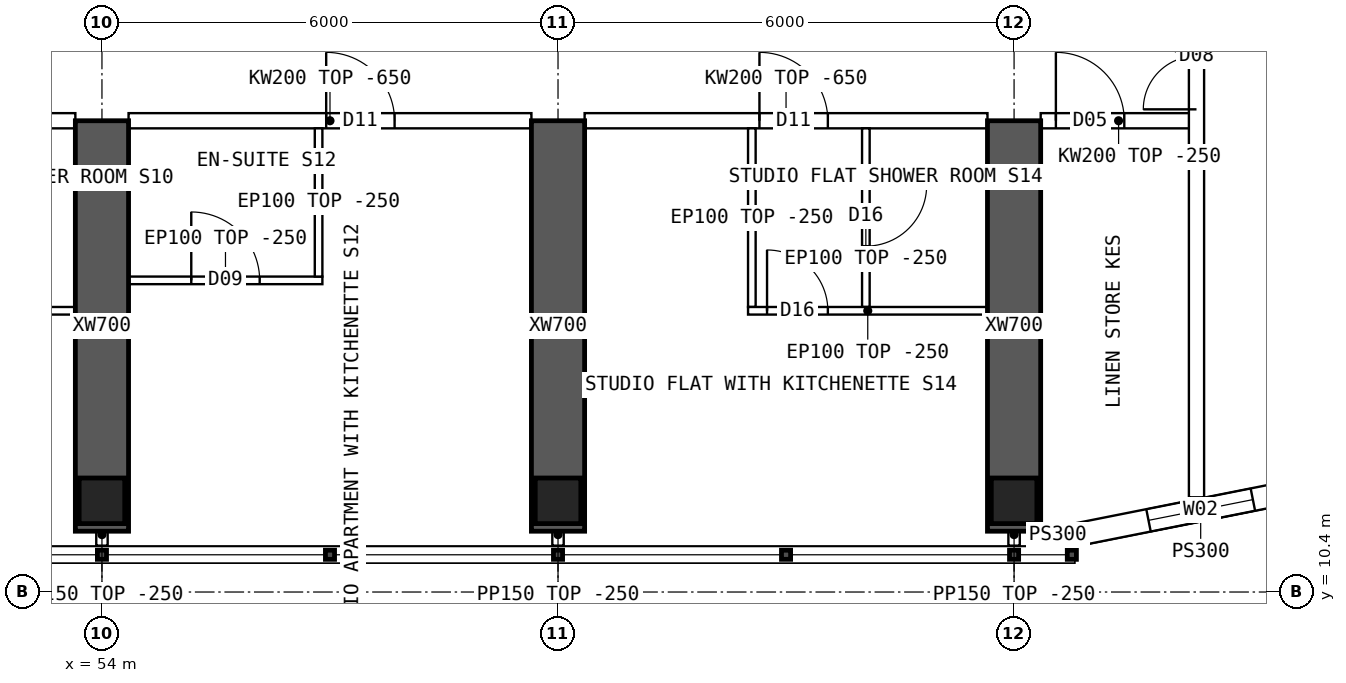
"""IFC4 building model, lengths in metres.
Left out: names, types, materials, properties, quantities, classifications, styles, units other than length and angle.
Written with IfcOpenShell. Run it as: python <this file> out.ifc"""

import sys

from ifc_helpers import new_model, si_unit, direction, frame, frame_2d, origin, origin_2d, place, context, subcontext, project, spatial, polyline, rectangle, hollow_rectangle, outline, extrude, element, fill, save


model = new_model("IFC4")
c1 = context("Model", 3, precision=1e-05, world=origin(), true_north=direction((0.0, 1.0)))
c2 = subcontext(c1, "Body", "Model", "MODEL_VIEW")
j1 = project(units=[si_unit("LENGTHUNIT", "METRE"), si_unit("PLANEANGLEUNIT", "RADIAN")], contexts=[c1])
p1 = place(None, origin())
s1 = spatial("IfcSite", under=j1, at=p1, CompositionType="ELEMENT")
p2 = place(p1, origin())
s2 = spatial("IfcBuilding", under=s1, at=p2, CompositionType="ELEMENT")
p3 = place(p2, frame((0.0, 0.0, 231.55)))
s3 = spatial("IfcBuildingStorey", under=s2, at=p3, CompositionType="ELEMENT", Elevation=231.55)
for number, where, z_axis, x_axis in (
    (1, (54.0, 11.6, 0.0), (0.0, 0.0, 1.0), (1.0, 0.0, 0.0)),
    (2, (60.0, 11.6, 0.0), (0.0, 0.0, 1.0), (1.0, 0.0, 0.0)),
    (3, (66.0, 11.6, 0.0), (0.0, 0.0, 1.0), (1.0, 0.0, 0.0)),
):
    element("IfcColumn", number, at=place(p3, frame(where, z_axis=z_axis, x_axis=x_axis)), inside=s3, PredefinedType="COLUMN", context=c2, shape_type="SweptSolid", body=[
        extrude(hollow_rectangle(XDim=0.6, YDim=0.6, WallThickness=0.06, at=origin_2d()), origin(), (0.0, 0.0, 1.0), 3.75),
    ])
for number, where, z_axis, x_axis in (
    (4, (54.0, 11.2, 0.0), (0.0, 0.0, 1.0), (0.0, 1.0, 0.0)),
    (5, (60.0, 11.2, 0.0), (0.0, 0.0, 1.0), (0.0, 1.0, 0.0)),
    (6, (66.0, 11.2, 0.0), (0.0, 0.0, 1.0), (0.0, 1.0, 0.0)),
):
    element("IfcWall", number, at=place(p3, frame(where, z_axis=z_axis, x_axis=x_axis)), inside=s3, PredefinedType="SHEAR", context=c2, shape_type="SweptSolid", body=[
        extrude(rectangle(XDim=5.4, YDim=0.7, at=frame_2d((2.7, 0.0))), origin(), (0.0, 0.0, 1.0), 3.75),
    ])
p4 = place(p3, frame((66.8, 11.15, 0.0), z_axis=(0.0, 0.0, 1.0), x_axis=(0.98078325777, 0.195100490205, 0.0)))
e7 = element("IfcWall", 7, at=p4, inside=s3, PredefinedType="SOLIDWALL", context=c2, shape_type="SweptSolid", body=[
    extrude(outline(polyline([(-0.03, -0.15), (3.405, -0.15), (3.345, 0.15), (0.03, 0.15), (-0.03, -0.15)])), origin(), (0.0, 0.0, 1.0), 3.5),
])
p5 = place(p4, frame((0.988, 0.0, 0.9)))
e8 = element("IfcOpeningElement", 8, at=p5, cuts=e7, PredefinedType="OPENING", context=c2, shape_type="SweptSolid", body=[
    extrude(rectangle(XDim=1.4, YDim=1.8, at=frame_2d((0.7, 0.9))), frame((0.0, 0.16, 0.0), z_axis=(0.0, -1.0, 0.0), x_axis=(1.0, 0.0, 0.0)), (0.0, 0.0, 1.0), 0.32),
])
p6 = place(p3, frame((66.8, 11.15, 0.0), z_axis=(0.0, 0.0, 1.0), x_axis=(-1.0, 0.0, 0.0)))
e9 = element("IfcWall", 9, at=p6, inside=s3, PredefinedType="SOLIDWALL", context=c2, shape_type="SweptSolid", body=[
    extrude(rectangle(XDim=0.45, YDim=0.3, at=frame_2d((0.225, 0.0))), origin(), (0.0, 0.0, 1.0), 3.5),
])
p7 = place(p3, frame((48.35, 16.6, 0.0), z_axis=(0.0, 0.0, 1.0), x_axis=(1.0, 0.0, 0.0)))
e10 = element("IfcWall", 10, at=p7, inside=s3, PredefinedType="SOLIDWALL", context=c2, shape_type="SweptSolid", body=[
    extrude(outline(polyline([(0.0, 0.0), (5.3, 0.0), (5.3, 3.1), (0.0, 3.1), (0.0, 0.0)])), frame((0.0, 0.1, 0.0), z_axis=(0.0, -1.0, 0.0), x_axis=(1.0, 0.0, 0.0)), (0.0, 0.0, 1.0), 0.2),
])
p8 = place(p7, frame((2.3, 0.0, 0.0)))
e11 = element("IfcOpeningElement", 11, at=p8, cuts=e10, PredefinedType="OPENING", context=c2, shape_type="SweptSolid", body=[
    extrude(rectangle(XDim=0.9, YDim=2.1, at=frame_2d((0.45, 1.05))), frame((0.0, 0.11, 0.0), z_axis=(0.0, -1.0, 0.0), x_axis=(1.0, 0.0, 0.0)), (0.0, 0.0, 1.0), 0.22),
])
p9 = place(p3, frame((54.35, 16.6, 0.0), z_axis=(0.0, 0.0, 1.0), x_axis=(1.0, 0.0, 0.0)))
e12 = element("IfcWall", 12, at=p9, inside=s3, PredefinedType="SOLIDWALL", context=c2, shape_type="SweptSolid", body=[
    extrude(outline(polyline([(0.0, 0.0), (5.3, 0.0), (5.3, 3.1), (0.0, 3.1), (0.0, 0.0)])), frame((0.0, 0.1, 0.0), z_axis=(0.0, -1.0, 0.0), x_axis=(1.0, 0.0, 0.0)), (0.0, 0.0, 1.0), 0.2),
])
p10 = place(p9, frame((2.6, 0.0, 0.0)))
e13 = element("IfcOpeningElement", 13, at=p10, cuts=e12, PredefinedType="OPENING", context=c2, shape_type="SweptSolid", body=[
    extrude(rectangle(XDim=0.9, YDim=2.1, at=frame_2d((0.45, 1.05))), frame((0.0, 0.11, 0.0), z_axis=(0.0, -1.0, 0.0), x_axis=(1.0, 0.0, 0.0)), (0.0, 0.0, 1.0), 0.22),
])
p11 = place(p3, frame((60.35, 16.6, 0.0), z_axis=(0.0, 0.0, 1.0), x_axis=(1.0, 0.0, 0.0)))
e14 = element("IfcWall", 14, at=p11, inside=s3, PredefinedType="SOLIDWALL", context=c2, shape_type="SweptSolid", body=[
    extrude(outline(polyline([(0.0, 0.0), (5.3, 0.0), (5.3, 3.1), (0.0, 3.1), (0.0, 0.0)])), frame((0.0, 0.1, 0.0), z_axis=(0.0, -1.0, 0.0), x_axis=(1.0, 0.0, 0.0)), (0.0, 0.0, 1.0), 0.2),
])
p12 = place(p11, frame((2.3, 0.0, 0.0)))
e15 = element("IfcOpeningElement", 15, at=p12, cuts=e14, PredefinedType="OPENING", context=c2, shape_type="SweptSolid", body=[
    extrude(rectangle(XDim=0.9, YDim=2.1, at=frame_2d((0.45, 1.05))), frame((0.0, 0.11, 0.0), z_axis=(0.0, -1.0, 0.0), x_axis=(1.0, 0.0, 0.0)), (0.0, 0.0, 1.0), 0.22),
])
p13 = place(p3, frame((66.35, 16.6, 0.0), z_axis=(0.0, 0.0, 1.0), x_axis=(1.0, 0.0, 0.0)))
e16 = element("IfcWall", 16, at=p13, inside=s3, PredefinedType="SOLIDWALL", context=c2, shape_type="SweptSolid", body=[
    extrude(rectangle(XDim=2.05, YDim=0.2, at=frame_2d((1.025, 0.0))), origin(), (0.0, 0.0, 1.0), 3.5),
])
p14 = place(p13, frame((0.2, 0.0, 0.0)))
e17 = element("IfcOpeningElement", 17, at=p14, cuts=e16, PredefinedType="OPENING", context=c2, shape_type="SweptSolid", body=[
    extrude(rectangle(XDim=0.9, YDim=2.1, at=frame_2d((0.45, 1.05))), frame((0.0, 0.11, 0.0), z_axis=(0.0, -1.0, 0.0), x_axis=(1.0, 0.0, 0.0)), (0.0, 0.0, 1.0), 0.22),
])
p15 = place(p3, frame((53.65, 14.1, 0.0), z_axis=(0.0, 0.0, 1.0), x_axis=(-1.0, 0.0, 0.0)))
e18 = element("IfcWall", 18, at=p15, inside=s3, PredefinedType="PARTITIONING", context=c2, shape_type="SweptSolid", body=[
    extrude(rectangle(XDim=3.15, YDim=0.1, at=frame_2d((1.575, 0.0))), origin(), (0.0, 0.0, 1.0), 3.5),
])
p16 = place(p15, frame((2.1, 0.0, 0.0)))
e19 = element("IfcOpeningElement", 19, at=p16, cuts=e18, PredefinedType="OPENING", context=c2, shape_type="SweptSolid", body=[
    extrude(rectangle(XDim=0.8, YDim=2.1, at=frame_2d((0.4, 1.05))), frame((0.0, 0.06, 0.0), z_axis=(0.0, -1.0, 0.0), x_axis=(1.0, 0.0, 0.0)), (0.0, 0.0, 1.0), 0.12),
])
p17 = place(p3, frame((56.9, 14.5, 0.0), z_axis=(0.0, 0.0, 1.0), x_axis=(-1.0, 0.0, 0.0)))
e20 = element("IfcWall", 20, at=p17, inside=s3, PredefinedType="PARTITIONING", context=c2, shape_type="SweptSolid", body=[
    extrude(rectangle(XDim=2.55, YDim=0.1, at=frame_2d((1.275, 0.0))), origin(), (0.0, 0.0, 1.0), 3.5),
])
p18 = place(p17, frame((0.825, 0.0, 0.0)))
e21 = element("IfcOpeningElement", 21, at=p18, cuts=e20, PredefinedType="OPENING", context=c2, shape_type="SweptSolid", body=[
    extrude(rectangle(XDim=0.9, YDim=2.1, at=frame_2d((0.45, 1.05))), frame((0.0, 0.06, 0.0), z_axis=(0.0, -1.0, 0.0), x_axis=(1.0, 0.0, 0.0)), (0.0, 0.0, 1.0), 0.12),
])
p19 = place(p3, frame((56.85, 14.55, 0.0), z_axis=(0.0, 0.0, 1.0), x_axis=(0.0, 1.0, 0.0)))
e22 = element("IfcWall", 22, at=p19, inside=s3, PredefinedType="PARTITIONING", context=c2, shape_type="SweptSolid", body=[
    extrude(outline(polyline([(0.0, 0.0), (1.95, 0.0), (1.95, 3.1), (1.902, 3.1), (1.9, 3.5), (0.0, 3.5), (0.0, 0.0)])), frame((0.0, 0.05, 0.0), z_axis=(0.0, -1.0, 0.0), x_axis=(1.0, 0.0, 0.0)), (0.0, 0.0, 1.0), 0.1),
])
p20 = place(p3, frame((65.65, 14.1, 0.0), z_axis=(0.0, 0.0, 1.0), x_axis=(-1.0, 0.0, 0.0)))
e23 = element("IfcWall", 23, at=p20, inside=s3, PredefinedType="PARTITIONING", context=c2, shape_type="SweptSolid", body=[
    extrude(rectangle(XDim=3.15, YDim=0.1, at=frame_2d((1.575, 0.0))), origin(), (0.0, 0.0, 1.0), 3.5),
])
p21 = place(p20, frame((2.1, 0.0, 0.0)))
e24 = element("IfcOpeningElement", 24, at=p21, cuts=e23, PredefinedType="OPENING", context=c2, shape_type="SweptSolid", body=[
    extrude(rectangle(XDim=0.8, YDim=2.1, at=frame_2d((0.4, 1.05))), frame((0.0, 0.06, 0.0), z_axis=(0.0, -1.0, 0.0), x_axis=(1.0, 0.0, 0.0)), (0.0, 0.0, 1.0), 0.12),
])
p22 = place(p3, frame((62.55, 14.15, 0.0), z_axis=(0.0, 0.0, 1.0), x_axis=(0.0, 1.0, 0.0)))
e25 = element("IfcWall", 25, at=p22, inside=s3, PredefinedType="PARTITIONING", context=c2, shape_type="SweptSolid", body=[
    extrude(outline(polyline([(0.0, 0.0), (2.35, 0.0), (2.35, 3.1), (2.302, 3.1), (2.3, 3.5), (0.0, 3.5), (0.0, 0.0)])), frame((0.0, 0.05, 0.0), z_axis=(0.0, -1.0, 0.0), x_axis=(1.0, 0.0, 0.0)), (0.0, 0.0, 1.0), 0.1),
])
p23 = place(p3, frame((64.05, 14.15, 0.0), z_axis=(0.0, 0.0, 1.0), x_axis=(0.0, 1.0, 0.0)))
e26 = element("IfcWall", 26, at=p23, inside=s3, PredefinedType="PARTITIONING", context=c2, shape_type="SweptSolid", body=[
    extrude(outline(polyline([(0.0, 0.0), (2.35, 0.0), (2.35, 3.1), (2.302, 3.1), (2.3, 3.5), (0.0, 3.5), (0.0, 0.0)])), frame((0.0, 0.05, 0.0), z_axis=(0.0, -1.0, 0.0), x_axis=(1.0, 0.0, 0.0)), (0.0, 0.0, 1.0), 0.1),
])
p24 = place(p23, frame((0.8, 0.0, 0.0)))
e27 = element("IfcOpeningElement", 27, at=p24, cuts=e26, PredefinedType="OPENING", context=c2, shape_type="SweptSolid", body=[
    extrude(rectangle(XDim=0.8, YDim=2.1, at=frame_2d((0.4, 1.05))), frame((0.0, 0.06, 0.0), z_axis=(0.0, -1.0, 0.0), x_axis=(1.0, 0.0, 0.0)), (0.0, 0.0, 1.0), 0.12),
])
p25 = place(p3, frame((68.4, 11.646, 0.0), z_axis=(0.0, 0.0, 1.0), x_axis=(0.0, 1.0, 0.0)))
e28 = element("IfcWall", 28, at=p25, inside=s3, PredefinedType="SOLIDWALL", context=c2, shape_type="SweptSolid", body=[
    extrude(rectangle(XDim=40.708, YDim=0.2, at=frame_2d((20.354, 0.0))), origin(), (0.0, 0.0, 1.0), 3.5),
])
p26 = place(p25, frame((13.434, 0.0, 0.0)))
e29 = element("IfcOpeningElement", 29, at=p26, cuts=e28, PredefinedType="OPENING", context=c2, shape_type="SweptSolid", body=[
    extrude(rectangle(XDim=1.2, YDim=2.1, at=frame_2d((0.6, 1.05))), frame((0.0, 0.11, 0.0), z_axis=(0.0, -1.0, 0.0), x_axis=(1.0, 0.0, 0.0)), (0.0, 0.0, 1.0), 0.22),
])
p27 = place(p25, frame((21.194, 0.0, 0.0)))
e30 = element("IfcOpeningElement", 30, at=p27, cuts=e28, PredefinedType="OPENING", context=c2, shape_type="SweptSolid", body=[
    extrude(rectangle(XDim=1.2, YDim=2.1, at=frame_2d((0.6, 1.05))), frame((0.0, 0.11, 0.0), z_axis=(0.0, -1.0, 0.0), x_axis=(1.0, 0.0, 0.0)), (0.0, 0.0, 1.0), 0.22),
])
p28 = place(p25, frame((5.104, 0.0, 0.0)))
e31 = element("IfcOpeningElement", 31, at=p28, cuts=e28, PredefinedType="OPENING", context=c2, shape_type="SweptSolid", body=[
    extrude(rectangle(XDim=1.4, YDim=2.1, at=frame_2d((0.7, 1.05))), frame((0.0, 0.11, 0.0), z_axis=(0.0, -1.0, 0.0), x_axis=(1.0, 0.0, 0.0)), (0.0, 0.0, 1.0), 0.22),
])
p29 = place(p25, frame((34.104, 0.0, 0.0)))
e32 = element("IfcOpeningElement", 32, at=p29, cuts=e28, PredefinedType="OPENING", context=c2, shape_type="SweptSolid", body=[
    extrude(rectangle(XDim=1.4, YDim=2.1, at=frame_2d((0.7, 1.05))), frame((0.0, 0.11, 0.0), z_axis=(0.0, -1.0, 0.0), x_axis=(1.0, 0.0, 0.0)), (0.0, 0.0, 1.0), 0.22),
])
for number, where, z_axis, x_axis in (
    (33, (54.0, 11.3, 0.0), (0.0, 0.0, 1.0), (0.0, -1.0, 0.0)),
    (34, (60.0, 11.3, 0.0), (0.0, 0.0, 1.0), (0.0, -1.0, 0.0)),
    (35, (66.0, 11.3, 0.0), (0.0, 0.0, 1.0), (0.0, -1.0, 0.0)),
):
    element("IfcWall", number, at=place(p3, frame(where, z_axis=z_axis, x_axis=x_axis)), inside=s3, PredefinedType="PARTITIONING", context=c2, shape_type="SweptSolid", body=[
        extrude(rectangle(XDim=0.29, YDim=0.15, at=frame_2d((0.145, 0.0))), origin(), (0.0, 0.0, 1.0), 3.5),
    ])
p30 = place(p5, origin())
e36 = element("IfcWindow", 36, at=p30, inside=s3, PartitioningType="SINGLE_PANEL", PredefinedType="WINDOW", context=c2, shape_type="SweptSolid", body=[
    extrude(rectangle(XDim=1.4, YDim=1.8, at=frame_2d((0.7, 0.9))), frame((0.0, 0.03, 0.0), z_axis=(0.0, -1.0, 0.0), x_axis=(1.0, 0.0, 0.0)), (0.0, 0.0, 1.0), 0.06),
])
fill(e8, e36)
p31 = place(p18, origin())
e37 = element("IfcDoor", 37, at=p31, inside=s3, OperationType="SINGLE_SWING_RIGHT", PredefinedType="DOOR", context=c2, shape_type="SweptSolid", body=[
    extrude(rectangle(XDim=0.9, YDim=2.1, at=frame_2d((0.45, 1.05))), frame((0.0, 0.025, 0.0), z_axis=(0.0, -1.0, 0.0), x_axis=(1.0, 0.0, 0.0)), (0.0, 0.0, 1.0), 0.05),
])
fill(e21, e37)
p32 = place(p10, origin())
e38 = element("IfcDoor", 38, at=p32, inside=s3, OperationType="SINGLE_SWING_LEFT", PredefinedType="DOOR", context=c2, shape_type="SweptSolid", body=[
    extrude(rectangle(XDim=0.9, YDim=2.1, at=frame_2d((0.45, 1.05))), frame((0.0, 0.025, 0.0), z_axis=(0.0, -1.0, 0.0), x_axis=(1.0, 0.0, 0.0)), (0.0, 0.0, 1.0), 0.05),
])
fill(e13, e38)
p33 = place(p21, origin())
e39 = element("IfcDoor", 39, at=p33, inside=s3, OperationType="SINGLE_SWING_RIGHT", PredefinedType="DOOR", context=c2, shape_type="SweptSolid", body=[
    extrude(rectangle(XDim=0.8, YDim=2.1, at=frame_2d((0.4, 1.05))), frame((0.0, 0.025, 0.0), z_axis=(0.0, -1.0, 0.0), x_axis=(1.0, 0.0, 0.0)), (0.0, 0.0, 1.0), 0.05),
])
fill(e24, e39)
p34 = place(p24, origin())
e40 = element("IfcDoor", 40, at=p34, inside=s3, OperationType="SINGLE_SWING_RIGHT", PredefinedType="DOOR", context=c2, shape_type="SweptSolid", body=[
    extrude(rectangle(XDim=0.8, YDim=2.1, at=frame_2d((0.4, 1.05))), frame((0.0, 0.025, 0.0), z_axis=(0.0, -1.0, 0.0), x_axis=(1.0, 0.0, 0.0)), (0.0, 0.0, 1.0), 0.05),
])
fill(e27, e40)
p35 = place(p12, origin())
e41 = element("IfcDoor", 41, at=p35, inside=s3, OperationType="SINGLE_SWING_LEFT", PredefinedType="DOOR", context=c2, shape_type="SweptSolid", body=[
    extrude(rectangle(XDim=0.9, YDim=2.1, at=frame_2d((0.45, 1.05))), frame((0.0, 0.025, 0.0), z_axis=(0.0, -1.0, 0.0), x_axis=(1.0, 0.0, 0.0)), (0.0, 0.0, 1.0), 0.05),
])
fill(e15, e41)
p36 = place(p28, origin())
e42 = element("IfcDoor", 42, at=p36, inside=s3, OperationType="DOUBLE_DOOR_SINGLE_SWING", PredefinedType="DOOR", context=c2, shape_type="SweptSolid", body=[
    extrude(rectangle(XDim=1.4, YDim=2.1, at=frame_2d((0.7, 1.05))), frame((0.0, 0.025, 0.0), z_axis=(0.0, -1.0, 0.0), x_axis=(1.0, 0.0, 0.0)), (0.0, 0.0, 1.0), 0.05),
])
fill(e31, e42)
p37 = place(p14, origin())
e43 = element("IfcDoor", 43, at=p37, inside=s3, OperationType="SINGLE_SWING_LEFT", PredefinedType="DOOR", context=c2, shape_type="SweptSolid", body=[
    extrude(rectangle(XDim=0.9, YDim=2.1, at=frame_2d((0.45, 1.05))), frame((0.0, 0.025, 0.0), z_axis=(0.0, -1.0, 0.0), x_axis=(1.0, 0.0, 0.0)), (0.0, 0.0, 1.0), 0.05),
])
fill(e17, e43)
save(model, sys.argv[1])
